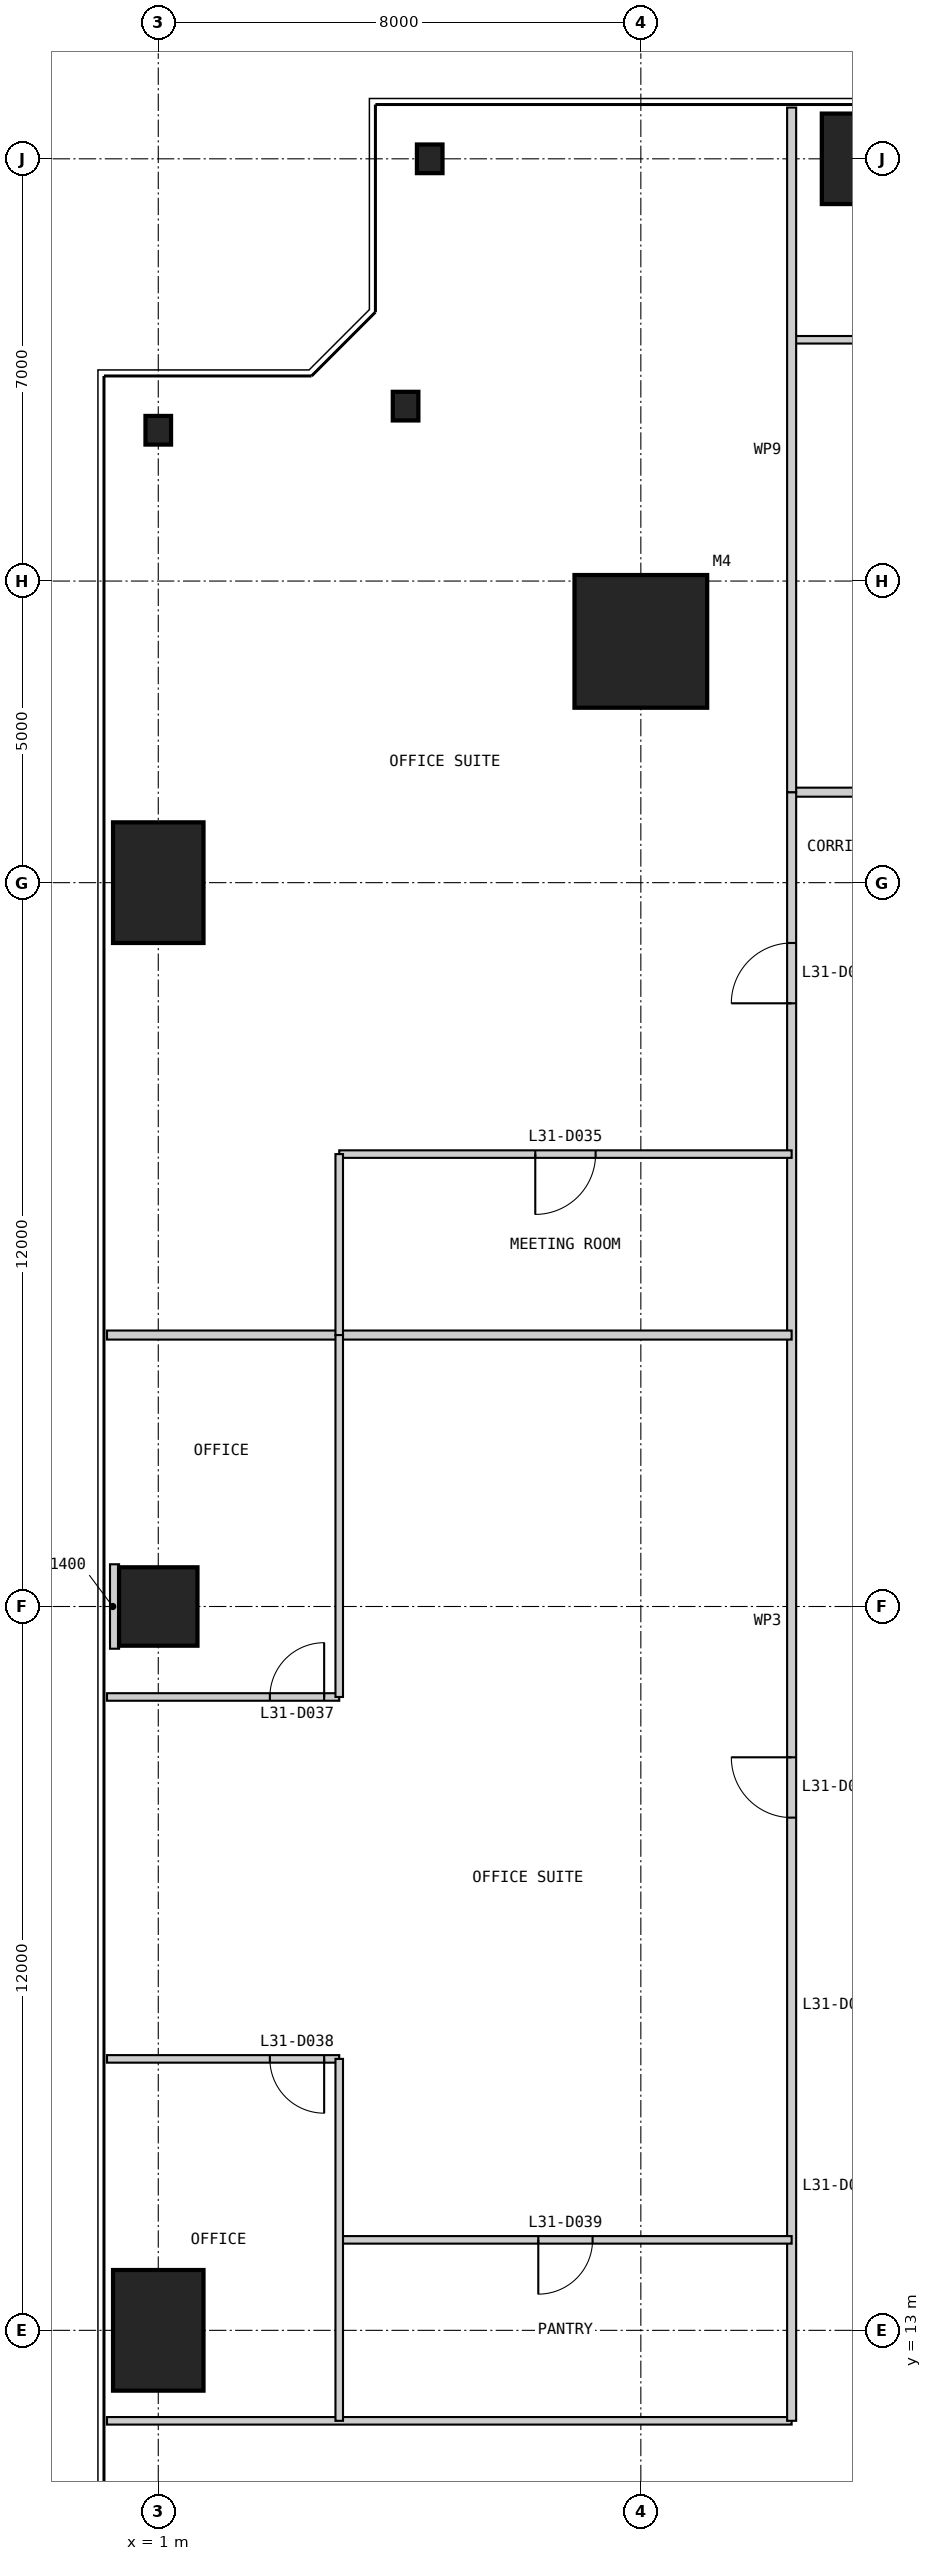
"""IFC4 building model, lengths in metres.
Left out: names, types, materials, properties, quantities, classifications, styles, units other than length and angle.
Written with IfcOpenShell. Run it as: python <this file> out.ifc"""

import sys

from ifc_helpers import new_model, si_unit, direction, frame, frame_2d, origin, origin_2d, place, context, subcontext, project, spatial, rectangle, i_section, extrude, element, fill, save


model = new_model("IFC4")
c1 = context("Model", 3, precision=1e-05, world=origin(), true_north=direction((0.0, 1.0)))
c2 = subcontext(c1, "Body", "Model", "MODEL_VIEW")
j1 = project(units=[si_unit("LENGTHUNIT", "METRE"), si_unit("PLANEANGLEUNIT", "RADIAN")], contexts=[c1])
p1 = place(None, origin())
s1 = spatial("IfcSite", under=j1, at=p1, CompositionType="ELEMENT")
p2 = place(p1, origin())
s2 = spatial("IfcBuilding", under=s1, at=p2, CompositionType="ELEMENT")
p3 = place(p2, frame((0.0, 0.0, 134.4)))
s3 = spatial("IfcBuildingStorey", under=s2, at=p3, CompositionType="ELEMENT", Elevation=134.4)
p4 = place(p3, frame((9.0, 41.0, 0.0), z_axis=(0.0, 0.0, 1.0), x_axis=(1.0, 0.0, 0.0)))
e1 = element("IfcColumn", 1, at=p4, inside=s3, PredefinedType="COLUMN", context=c2, shape_type="SweptSolid", body=[
    extrude(rectangle(XDim=2.2, YDim=2.2, at=origin_2d()), origin(), (0.0, 0.0, 1.0), 4.0),
])
p5 = place(p3, frame((13.0, 49.0, 0.0), z_axis=(0.0, 0.0, 1.0), x_axis=(1.0, 0.0, 0.0)))
e2 = element("IfcColumn", 2, at=p5, inside=s3, PredefinedType="COLUMN", context=c2, shape_type="SweptSolid", body=[
    extrude(rectangle(XDim=2.0, YDim=1.5, at=origin_2d()), origin(), (0.0, 0.0, 1.0), 4.0),
])
for number, where, z_axis, x_axis in (
    (3, (5.5, 49.0, 0.0), (0.0, 0.0, 1.0), (1.0, 0.0, 0.0)),
    (4, (5.1, 44.9, 0.0), (0.0, 0.0, 1.0), (1.0, 0.0, 0.0)),
    (5, (1.0, 44.5, 0.0), (0.0, 0.0, 1.0), (1.0, 0.0, 0.0)),
):
    element("IfcColumn", number, at=place(p3, frame(where, z_axis=z_axis, x_axis=x_axis)), inside=s3, PredefinedType="COLUMN", context=c2, shape_type="SweptSolid", body=[
        extrude(i_section(OverallWidth=0.424, OverallDepth=0.475, WebThickness=0.048, FlangeThickness=0.077, at=origin_2d()), origin(), (0.0, 0.0, 1.0), 4.0),
    ])
p6 = place(p3, frame((1.0, 37.0, 0.0), z_axis=(0.0, 0.0, 1.0), x_axis=(1.0, 0.0, 0.0)))
e6 = element("IfcColumn", 6, at=p6, inside=s3, PredefinedType="COLUMN", context=c2, shape_type="SweptSolid", body=[
    extrude(rectangle(XDim=1.5, YDim=2.0, at=origin_2d()), origin(), (0.0, 0.0, 1.0), 4.0),
])
p7 = place(p3, frame((1.0, 25.0, 0.0), z_axis=(0.0, 0.0, 1.0), x_axis=(1.0, 0.0, 0.0)))
e7 = element("IfcColumn", 7, at=p7, inside=s3, PredefinedType="COLUMN", context=c2, shape_type="SweptSolid", body=[
    extrude(rectangle(XDim=1.3, YDim=1.3, at=origin_2d()), origin(), (0.0, 0.0, 1.0), 4.0),
])
p8 = place(p3, frame((1.0, 13.0, 0.0), z_axis=(0.0, 0.0, 1.0), x_axis=(1.0, 0.0, 0.0)))
e8 = element("IfcColumn", 8, at=p8, inside=s3, PredefinedType="COLUMN", context=c2, shape_type="SweptSolid", body=[
    extrude(rectangle(XDim=1.5, YDim=2.0, at=origin_2d()), origin(), (0.0, 0.0, 1.0), 4.0),
])
p9 = place(p3, frame((0.15, 11.5, 0.0), z_axis=(0.0, 0.0, 1.0), x_axis=(1.0, 0.0, 0.0)))
e9 = element("IfcWall", 9, at=p9, inside=s3, PredefinedType="PARTITIONING", context=c2, shape_type="SweptSolid", body=[
    extrude(rectangle(XDim=11.35, YDim=0.125, at=frame_2d((5.675, 0.0))), origin(), (0.0, 0.0, 1.0), 3.85),
])
p10 = place(p3, frame((38.5, 38.5, 0.0), z_axis=(0.0, 0.0, 1.0), x_axis=(-1.0, 0.0, 0.0)))
e10 = element("IfcWall", 10, at=p10, inside=s3, PredefinedType="PARTITIONING", context=c2, shape_type="SweptSolid", body=[
    extrude(rectangle(XDim=27.0, YDim=0.15, at=frame_2d((13.5, 0.0))), origin(), (0.0, 0.0, 1.0), 3.85),
])
p11 = place(p10, frame((11.5, 0.0, 0.0)))
e11 = element("IfcOpeningElement", 11, at=p11, cuts=e10, PredefinedType="OPENING", context=c2, shape_type="SweptSolid", body=[
    extrude(rectangle(XDim=1.0, YDim=2.2, at=frame_2d((0.5, 1.1))), frame((0.0, 0.085, 0.0), z_axis=(0.0, -1.0, 0.0), x_axis=(1.0, 0.0, 0.0)), (0.0, 0.0, 1.0), 0.17),
])
p12 = place(p3, frame((35.5, 46.0, 0.0), z_axis=(0.0, 0.0, 1.0), x_axis=(-1.0, 0.0, 0.0)))
e12 = element("IfcWall", 12, at=p12, inside=s3, PredefinedType="PARTITIONING", context=c2, shape_type="SweptSolid", body=[
    extrude(rectangle(XDim=24.0, YDim=0.125, at=frame_2d((12.0, 0.0))), origin(), (0.0, 0.0, 1.0), 3.85),
])
p13 = place(p12, frame((10.05, 0.0, 0.0)))
e13 = element("IfcOpeningElement", 13, at=p13, cuts=e12, PredefinedType="OPENING", context=c2, shape_type="SweptSolid", body=[
    extrude(rectangle(XDim=0.9, YDim=2.2, at=frame_2d((0.45, 1.1))), frame((0.0, 0.073, 0.0), z_axis=(0.0, -1.0, 0.0), x_axis=(1.0, 0.0, 0.0)), (0.0, 0.0, 1.0), 0.145),
])
p14 = place(p12, frame((16.05, 0.0, 0.0)))
e14 = element("IfcOpeningElement", 14, at=p14, cuts=e12, PredefinedType="OPENING", context=c2, shape_type="SweptSolid", body=[
    extrude(rectangle(XDim=0.9, YDim=2.2, at=frame_2d((0.45, 1.1))), frame((0.0, 0.073, 0.0), z_axis=(0.0, -1.0, 0.0), x_axis=(1.0, 0.0, 0.0)), (0.0, 0.0, 1.0), 0.145),
])
p15 = place(p12, frame((19.0, 0.0, 0.0)))
e15 = element("IfcOpeningElement", 15, at=p15, cuts=e12, PredefinedType="OPENING", context=c2, shape_type="SweptSolid", body=[
    extrude(rectangle(XDim=1.0, YDim=2.2, at=frame_2d((0.5, 1.1))), frame((0.0, 0.073, 0.0), z_axis=(0.0, -1.0, 0.0), x_axis=(1.0, 0.0, 0.0)), (0.0, 0.0, 1.0), 0.145),
])
p16 = place(p3, frame((11.5, 38.5, 0.0), z_axis=(0.0, 0.0, 1.0), x_axis=(0.0, -1.0, 0.0)))
e16 = element("IfcWall", 16, at=p16, inside=s3, PredefinedType="PARTITIONING", context=c2, shape_type="SweptSolid", body=[
    extrude(rectangle(XDim=27.0, YDim=0.15, at=frame_2d((13.5, 0.0))), origin(), (0.0, 0.0, 1.0), 3.85),
])
p17 = place(p16, frame((2.5, 0.0, 0.0)))
e17 = element("IfcOpeningElement", 17, at=p17, cuts=e16, PredefinedType="OPENING", context=c2, shape_type="SweptSolid", body=[
    extrude(rectangle(XDim=1.0, YDim=2.2, at=frame_2d((0.5, 1.1))), frame((0.0, 0.085, 0.0), z_axis=(0.0, -1.0, 0.0), x_axis=(1.0, 0.0, 0.0)), (0.0, 0.0, 1.0), 0.17),
])
p18 = place(p16, frame((16.0, 0.0, 0.0)))
e18 = element("IfcOpeningElement", 18, at=p18, cuts=e16, PredefinedType="OPENING", context=c2, shape_type="SweptSolid", body=[
    extrude(rectangle(XDim=1.0, YDim=2.2, at=frame_2d((0.5, 1.1))), frame((0.0, 0.085, 0.0), z_axis=(0.0, -1.0, 0.0), x_axis=(1.0, 0.0, 0.0)), (0.0, 0.0, 1.0), 0.17),
])
p19 = place(p3, frame((11.5, 49.85, 0.0), z_axis=(0.0, 0.0, 1.0), x_axis=(0.0, -1.0, 0.0)))
e19 = element("IfcWall", 19, at=p19, inside=s3, PredefinedType="PARTITIONING", context=c2, shape_type="SweptSolid", body=[
    extrude(rectangle(XDim=11.35, YDim=0.15, at=frame_2d((5.675, 0.0))), origin(), (0.0, 0.0, 1.0), 3.85),
])
p20 = place(p3, frame((4.0, 32.5, 0.0), z_axis=(0.0, 0.0, 1.0), x_axis=(1.0, 0.0, 0.0)))
e20 = element("IfcWall", 20, at=p20, inside=s3, PredefinedType="PARTITIONING", context=c2, shape_type="SweptSolid", body=[
    extrude(rectangle(XDim=7.5, YDim=0.125, at=frame_2d((3.75, 0.0))), origin(), (0.0, 0.0, 1.0), 3.85),
])
p21 = place(p20, frame((3.25, 0.0, 0.0)))
e21 = element("IfcOpeningElement", 21, at=p21, cuts=e20, PredefinedType="OPENING", context=c2, shape_type="SweptSolid", body=[
    extrude(rectangle(XDim=1.0, YDim=2.2, at=frame_2d((0.5, 1.1))), frame((0.0, 0.073, 0.0), z_axis=(0.0, -1.0, 0.0), x_axis=(1.0, 0.0, 0.0)), (0.0, 0.0, 1.0), 0.145),
])
p22 = place(p3, frame((0.15, 29.5, 0.0), z_axis=(0.0, 0.0, 1.0), x_axis=(1.0, 0.0, 0.0)))
e22 = element("IfcWall", 22, at=p22, inside=s3, PredefinedType="PARTITIONING", context=c2, shape_type="SweptSolid", body=[
    extrude(rectangle(XDim=11.35, YDim=0.15, at=frame_2d((5.675, 0.0))), origin(), (0.0, 0.0, 1.0), 3.85),
])
p23 = place(p3, frame((0.15, 23.5, 0.0), z_axis=(0.0, 0.0, 1.0), x_axis=(1.0, 0.0, 0.0)))
e23 = element("IfcWall", 23, at=p23, inside=s3, PredefinedType="PARTITIONING", context=c2, shape_type="SweptSolid", body=[
    extrude(rectangle(XDim=3.85, YDim=0.125, at=frame_2d((1.925, 0.0))), origin(), (0.0, 0.0, 1.0), 3.85),
])
p24 = place(p23, frame((2.7, 0.0, 0.0)))
e24 = element("IfcOpeningElement", 24, at=p24, cuts=e23, PredefinedType="OPENING", context=c2, shape_type="SweptSolid", body=[
    extrude(rectangle(XDim=0.9, YDim=2.2, at=frame_2d((0.45, 1.1))), frame((0.0, 0.073, 0.0), z_axis=(0.0, -1.0, 0.0), x_axis=(1.0, 0.0, 0.0)), (0.0, 0.0, 1.0), 0.145),
])
p25 = place(p3, frame((0.15, 17.5, 0.0), z_axis=(0.0, 0.0, 1.0), x_axis=(1.0, 0.0, 0.0)))
e25 = element("IfcWall", 25, at=p25, inside=s3, PredefinedType="PARTITIONING", context=c2, shape_type="SweptSolid", body=[
    extrude(rectangle(XDim=3.85, YDim=0.125, at=frame_2d((1.925, 0.0))), origin(), (0.0, 0.0, 1.0), 3.85),
])
p26 = place(p25, frame((2.7, 0.0, 0.0)))
e26 = element("IfcOpeningElement", 26, at=p26, cuts=e25, PredefinedType="OPENING", context=c2, shape_type="SweptSolid", body=[
    extrude(rectangle(XDim=0.9, YDim=2.2, at=frame_2d((0.45, 1.1))), frame((0.0, 0.073, 0.0), z_axis=(0.0, -1.0, 0.0), x_axis=(1.0, 0.0, 0.0)), (0.0, 0.0, 1.0), 0.145),
])
p27 = place(p3, frame((4.0, 14.5, 0.0), z_axis=(0.0, 0.0, 1.0), x_axis=(1.0, 0.0, 0.0)))
e27 = element("IfcWall", 27, at=p27, inside=s3, PredefinedType="PARTITIONING", context=c2, shape_type="SweptSolid", body=[
    extrude(rectangle(XDim=7.5, YDim=0.125, at=frame_2d((3.75, 0.0))), origin(), (0.0, 0.0, 1.0), 3.85),
])
p28 = place(p27, frame((3.3, 0.0, 0.0)))
e28 = element("IfcOpeningElement", 28, at=p28, cuts=e27, PredefinedType="OPENING", context=c2, shape_type="SweptSolid", body=[
    extrude(rectangle(XDim=0.9, YDim=2.2, at=frame_2d((0.45, 1.1))), frame((0.0, 0.073, 0.0), z_axis=(0.0, -1.0, 0.0), x_axis=(1.0, 0.0, 0.0)), (0.0, 0.0, 1.0), 0.145),
])
p29 = place(p3, frame((4.0, 32.5, 0.0), z_axis=(0.0, 0.0, 1.0), x_axis=(0.0, -1.0, 0.0)))
e29 = element("IfcWall", 29, at=p29, inside=s3, PredefinedType="PARTITIONING", context=c2, shape_type="SweptSolid", body=[
    extrude(rectangle(XDim=3.0, YDim=0.125, at=frame_2d((1.5, 0.0))), origin(), (0.0, 0.0, 1.0), 3.238),
])
for number, where, z_axis, x_axis in (
    (30, (4.0, 29.5, 0.0), (0.0, 0.0, 1.0), (0.0, -1.0, 0.0)),
    (31, (4.0, 17.5, 0.0), (0.0, 0.0, 1.0), (0.0, -1.0, 0.0)),
):
    element("IfcWall", number, at=place(p3, frame(where, z_axis=z_axis, x_axis=x_axis)), inside=s3, PredefinedType="PARTITIONING", context=c2, shape_type="SweptSolid", body=[
        extrude(rectangle(XDim=6.0, YDim=0.125, at=frame_2d((3.0, 0.0))), origin(), (0.0, 0.0, 1.0), 3.238),
    ])
p30 = place(p3, frame((0.2, 25.0, 0.0), z_axis=(0.0, 0.0, 1.0), x_axis=(1.0, 0.0, 0.0)))
e32 = element("IfcWall", 32, at=p30, inside=s3, PredefinedType="PARTITIONING", context=c2, shape_type="SweptSolid", body=[
    extrude(rectangle(XDim=0.15, YDim=1.4, at=frame_2d((0.075, 0.0))), origin(), (0.0, 0.0, 1.0), 3.85),
])
p31 = place(p17, frame((1.0, 0.0, 0.0), z_axis=(0.0, 0.0, 1.0), x_axis=(-1.0, 0.0, 0.0)))
e33 = element("IfcDoor", 33, at=p31, inside=s3, OperationType="SINGLE_SWING_LEFT", PredefinedType="DOOR", context=c2, shape_type="SweptSolid", body=[
    extrude(rectangle(XDim=1.0, YDim=2.2, at=frame_2d((0.5, 1.1))), frame((0.0, 0.025, 0.0), z_axis=(0.0, -1.0, 0.0), x_axis=(1.0, 0.0, 0.0)), (0.0, 0.0, 1.0), 0.05),
])
fill(e17, e33)
p32 = place(p21, frame((1.0, 0.0, 0.0), z_axis=(0.0, 0.0, 1.0), x_axis=(-1.0, 0.0, 0.0)))
e34 = element("IfcDoor", 34, at=p32, inside=s3, OperationType="SINGLE_SWING_RIGHT", PredefinedType="DOOR", context=c2, shape_type="SweptSolid", body=[
    extrude(rectangle(XDim=1.0, YDim=2.2, at=frame_2d((0.5, 1.1))), frame((0.0, 0.025, 0.0), z_axis=(0.0, -1.0, 0.0), x_axis=(1.0, 0.0, 0.0)), (0.0, 0.0, 1.0), 0.05),
])
fill(e21, e34)
p33 = place(p18, frame((1.0, 0.0, 0.0), z_axis=(0.0, 0.0, 1.0), x_axis=(-1.0, 0.0, 0.0)))
e35 = element("IfcDoor", 35, at=p33, inside=s3, OperationType="SINGLE_SWING_RIGHT", PredefinedType="DOOR", context=c2, shape_type="SweptSolid", body=[
    extrude(rectangle(XDim=1.0, YDim=2.2, at=frame_2d((0.5, 1.1))), frame((0.0, 0.025, 0.0), z_axis=(0.0, -1.0, 0.0), x_axis=(1.0, 0.0, 0.0)), (0.0, 0.0, 1.0), 0.05),
])
fill(e18, e35)
p34 = place(p24, origin())
e36 = element("IfcDoor", 36, at=p34, inside=s3, OperationType="SINGLE_SWING_RIGHT", PredefinedType="DOOR", context=c2, shape_type="SweptSolid", body=[
    extrude(rectangle(XDim=0.9, YDim=2.2, at=frame_2d((0.45, 1.1))), frame((0.0, 0.025, 0.0), z_axis=(0.0, -1.0, 0.0), x_axis=(1.0, 0.0, 0.0)), (0.0, 0.0, 1.0), 0.05),
])
fill(e24, e36)
p35 = place(p26, frame((0.9, 0.0, 0.0), z_axis=(0.0, 0.0, 1.0), x_axis=(-1.0, 0.0, 0.0)))
e37 = element("IfcDoor", 37, at=p35, inside=s3, OperationType="SINGLE_SWING_LEFT", PredefinedType="DOOR", context=c2, shape_type="SweptSolid", body=[
    extrude(rectangle(XDim=0.9, YDim=2.2, at=frame_2d((0.45, 1.1))), frame((0.0, 0.025, 0.0), z_axis=(0.0, -1.0, 0.0), x_axis=(1.0, 0.0, 0.0)), (0.0, 0.0, 1.0), 0.05),
])
fill(e26, e37)
p36 = place(p28, frame((0.9, 0.0, 0.0), z_axis=(0.0, 0.0, 1.0), x_axis=(-1.0, 0.0, 0.0)))
e38 = element("IfcDoor", 38, at=p36, inside=s3, OperationType="SINGLE_SWING_RIGHT", PredefinedType="DOOR", context=c2, shape_type="SweptSolid", body=[
    extrude(rectangle(XDim=0.9, YDim=2.2, at=frame_2d((0.45, 1.1))), frame((0.0, 0.025, 0.0), z_axis=(0.0, -1.0, 0.0), x_axis=(1.0, 0.0, 0.0)), (0.0, 0.0, 1.0), 0.05),
])
fill(e28, e38)
save(model, sys.argv[1])
